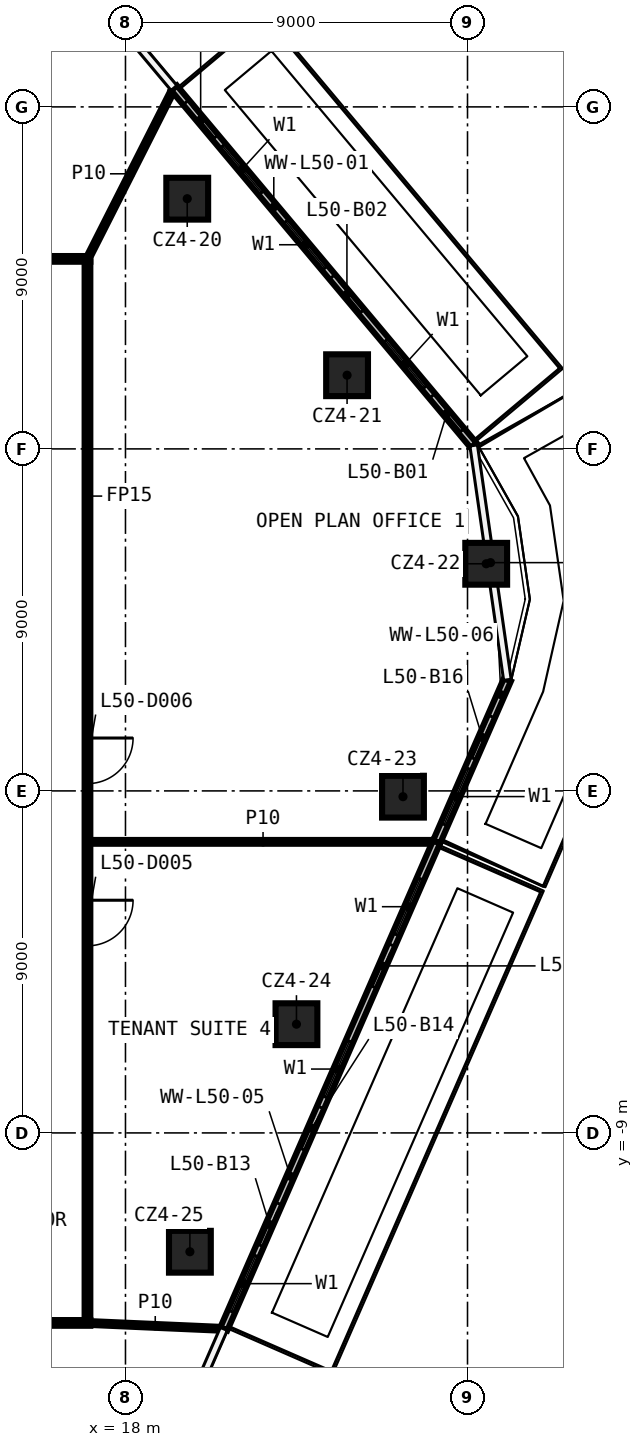
"""IFC4 building model, lengths in metres.
Left out: names, types, materials, properties, quantities, classifications, styles, units other than length and angle.
Written with IfcOpenShell. Run it as: python <this file> out.ifc"""

import sys

from ifc_helpers import new_model, si_unit, direction, frame, frame_2d, origin, origin_2d, place, context, subcontext, project, spatial, rectangle, extrude, element, fill, save


model = new_model("IFC4")
c1 = context("Model", 3, precision=1e-05, world=origin(), true_north=direction((0.0, 1.0)))
c2 = subcontext(c1, "Body", "Model", "MODEL_VIEW")
j1 = project(units=[si_unit("LENGTHUNIT", "METRE"), si_unit("PLANEANGLEUNIT", "RADIAN")], contexts=[c1])
p1 = place(None, origin())
s1 = spatial("IfcSite", under=j1, at=p1, CompositionType="ELEMENT")
p2 = place(p1, origin())
s2 = spatial("IfcBuilding", under=s1, at=p2, CompositionType="ELEMENT")
p3 = place(p2, frame((0.0, 0.0, 241.2)))
s3 = spatial("IfcBuildingStorey", under=s2, at=p3, CompositionType="ELEMENT", Elevation=241.2)
for number, where, z_axis, x_axis in (
    (1, (19.625, 15.584, 0.0), (0.0, 0.0, 1.0), (1.0, 0.0, 0.0)),
    (2, (23.831, 10.939, 0.0), (0.0, 0.0, 1.0), (1.0, 0.0, 0.0)),
    (3, (27.492, 5.977, 0.0), (0.0, 0.0, 1.0), (1.0, 0.0, 0.0)),
    (4, (25.302, -0.152, 0.0), (0.0, 0.0, 1.0), (1.0, 0.0, 0.0)),
    (5, (22.499, -6.139, 0.0), (0.0, 0.0, 1.0), (1.0, 0.0, 0.0)),
    (6, (19.695, -12.127, 0.0), (0.0, 0.0, 1.0), (1.0, 0.0, 0.0)),
):
    element("IfcColumn", number, at=place(p3, frame(where, z_axis=z_axis, x_axis=x_axis)), inside=s3, PredefinedType="COLUMN", context=c2, shape_type="SweptSolid", body=[
        extrude(rectangle(XDim=1.1, YDim=1.1, at=origin_2d()), origin(), (0.0, 0.0, 1.0), 3.82),
    ])
p4 = place(p3, frame((17.075, -14.0, 0.0), z_axis=(0.0, 0.0, 1.0), x_axis=(-1.0, 0.0, 0.0)))
e7 = element("IfcWall", 7, at=p4, inside=s3, PredefinedType="PARTITIONING", context=c2, shape_type="SweptSolid", body=[
    extrude(rectangle(XDim=26.15, YDim=0.15, at=frame_2d((13.075, 0.0))), origin(), (0.0, 0.0, 1.0), 3.82),
])
p5 = place(p4, frame((23.476, 0.0, 0.0)))
e8 = element("IfcOpeningElement", 8, at=p5, cuts=e7, PredefinedType="OPENING", context=c2, shape_type="SweptSolid", body=[
    extrude(rectangle(XDim=1.2, YDim=2.1, at=frame_2d((0.6, 1.05))), frame((0.0, 0.085, 0.0), z_axis=(0.0, -1.0, 0.0), x_axis=(1.0, 0.0, 0.0)), (0.0, 0.0, 1.0), 0.17),
])
p6 = place(p4, frame((19.452, 0.0, 0.0)))
e9 = element("IfcOpeningElement", 9, at=p6, cuts=e7, PredefinedType="OPENING", context=c2, shape_type="SweptSolid", body=[
    extrude(rectangle(XDim=1.2, YDim=2.1, at=frame_2d((0.6, 1.05))), frame((0.0, 0.085, 0.0), z_axis=(0.0, -1.0, 0.0), x_axis=(1.0, 0.0, 0.0)), (0.0, 0.0, 1.0), 0.17),
])
p7 = place(p4, frame((11.351, 0.0, 0.0)))
e10 = element("IfcOpeningElement", 10, at=p7, cuts=e7, PredefinedType="OPENING", context=c2, shape_type="SweptSolid", body=[
    extrude(rectangle(XDim=1.2, YDim=2.1, at=frame_2d((0.6, 1.05))), frame((0.0, 0.085, 0.0), z_axis=(0.0, -1.0, 0.0), x_axis=(1.0, 0.0, 0.0)), (0.0, 0.0, 1.0), 0.17),
])
p8 = place(p4, frame((3.125, 0.0, 0.0)))
e11 = element("IfcOpeningElement", 11, at=p8, cuts=e7, PredefinedType="OPENING", context=c2, shape_type="SweptSolid", body=[
    extrude(rectangle(XDim=1.2, YDim=2.1, at=frame_2d((0.6, 1.05))), frame((0.0, 0.085, 0.0), z_axis=(0.0, -1.0, 0.0), x_axis=(1.0, 0.0, 0.0)), (0.0, 0.0, 1.0), 0.17),
])
p9 = place(p3, frame((17.075, -1.341, 0.0), z_axis=(0.0, 0.0, 1.0), x_axis=(1.0, 0.0, 0.0)))
e12 = element("IfcWall", 12, at=p9, inside=s3, PredefinedType="PARTITIONING", context=c2, shape_type="SweptSolid", body=[
    extrude(rectangle(XDim=9.09, YDim=0.1, at=frame_2d((4.545, 0.0))), origin(), (0.0, 0.0, 1.0), 3.82),
])
p10 = place(p3, frame((-9.075, 14.0, 0.0), z_axis=(0.0, 0.0, 1.0), x_axis=(1.0, 0.0, 0.0)))
e13 = element("IfcWall", 13, at=p10, inside=s3, PredefinedType="PARTITIONING", context=c2, shape_type="SweptSolid", body=[
    extrude(rectangle(XDim=26.15, YDim=0.15, at=frame_2d((13.075, 0.0))), origin(), (0.0, 0.0, 1.0), 3.82),
])
p11 = place(p10, frame((20.934, 0.0, 0.0)))
e14 = element("IfcOpeningElement", 14, at=p11, cuts=e13, PredefinedType="OPENING", context=c2, shape_type="SweptSolid", body=[
    extrude(rectangle(XDim=1.2, YDim=2.1, at=frame_2d((0.6, 1.05))), frame((0.0, 0.085, 0.0), z_axis=(0.0, -1.0, 0.0), x_axis=(1.0, 0.0, 0.0)), (0.0, 0.0, 1.0), 0.17),
])
p12 = place(p10, frame((15.49, 0.0, 0.0)))
e15 = element("IfcOpeningElement", 15, at=p12, cuts=e13, PredefinedType="OPENING", context=c2, shape_type="SweptSolid", body=[
    extrude(rectangle(XDim=1.2, YDim=2.1, at=frame_2d((0.6, 1.05))), frame((0.0, 0.085, 0.0), z_axis=(0.0, -1.0, 0.0), x_axis=(1.0, 0.0, 0.0)), (0.0, 0.0, 1.0), 0.17),
])
p13 = place(p10, frame((7.396, 0.0, 0.0)))
e16 = element("IfcOpeningElement", 16, at=p13, cuts=e13, PredefinedType="OPENING", context=c2, shape_type="SweptSolid", body=[
    extrude(rectangle(XDim=1.2, YDim=2.1, at=frame_2d((0.6, 1.05))), frame((0.0, 0.085, 0.0), z_axis=(0.0, -1.0, 0.0), x_axis=(1.0, 0.0, 0.0)), (0.0, 0.0, 1.0), 0.17),
])
p14 = place(p10, frame((3.346, 0.0, 0.0)))
e17 = element("IfcOpeningElement", 17, at=p14, cuts=e13, PredefinedType="OPENING", context=c2, shape_type="SweptSolid", body=[
    extrude(rectangle(XDim=1.2, YDim=2.1, at=frame_2d((0.6, 1.05))), frame((0.0, 0.085, 0.0), z_axis=(0.0, -1.0, 0.0), x_axis=(1.0, 0.0, 0.0)), (0.0, 0.0, 1.0), 0.17),
])
p15 = place(p3, frame((17.0, 14.0, 0.0), z_axis=(0.0, 0.0, 1.0), x_axis=(0.451643796449, 0.892198341811, 0.0)))
e18 = element("IfcWall", 18, at=p15, inside=s3, PredefinedType="PARTITIONING", context=c2, shape_type="SweptSolid", body=[
    extrude(rectangle(XDim=5.02, YDim=0.1, at=frame_2d((2.51, 0.0))), origin(), (0.0, 0.0, 1.0), 3.82),
])
p16 = place(p3, frame((17.0, 13.925, 0.0), z_axis=(0.0, 0.0, 1.0), x_axis=(0.0, -1.0, 0.0)))
e19 = element("IfcWall", 19, at=p16, inside=s3, PredefinedType="PARTITIONING", context=c2, shape_type="SweptSolid", body=[
    extrude(rectangle(XDim=27.85, YDim=0.15, at=frame_2d((13.925, 0.0))), origin(), (0.0, 0.0, 1.0), 3.82),
])
p17 = place(p16, frame((16.802, 0.0, 0.0)))
e20 = element("IfcOpeningElement", 20, at=p17, cuts=e19, PredefinedType="OPENING", context=c2, shape_type="SweptSolid", body=[
    extrude(rectangle(XDim=1.2, YDim=2.1, at=frame_2d((0.6, 1.05))), frame((0.0, 0.085, 0.0), z_axis=(0.0, -1.0, 0.0), x_axis=(1.0, 0.0, 0.0)), (0.0, 0.0, 1.0), 0.17),
])
p18 = place(p16, frame((12.534, 0.0, 0.0)))
e21 = element("IfcOpeningElement", 21, at=p18, cuts=e19, PredefinedType="OPENING", context=c2, shape_type="SweptSolid", body=[
    extrude(rectangle(XDim=1.2, YDim=2.1, at=frame_2d((0.6, 1.05))), frame((0.0, 0.085, 0.0), z_axis=(0.0, -1.0, 0.0), x_axis=(1.0, 0.0, 0.0)), (0.0, 0.0, 1.0), 0.17),
])
p19 = place(p3, frame((17.0, -14.0, 0.0), z_axis=(0.0, 0.0, 1.0), x_axis=(0.99903279054, -0.043971393272, 0.0)))
e22 = element("IfcWall", 22, at=p19, inside=s3, PredefinedType="PARTITIONING", context=c2, shape_type="SweptSolid", body=[
    extrude(rectangle(XDim=3.57, YDim=0.1, at=frame_2d((1.785, 0.0))), origin(), (0.0, 0.0, 1.0), 3.82),
])
p20 = place(p3, frame((27.162, 9.091, 0.0), z_axis=(0.0, 0.0, 1.0), x_axis=(-0.642398297857, 0.766370946025, 0.0)))
e23 = element("IfcWall", 23, at=p20, inside=s3, PredefinedType="SOLIDWALL", context=c2, shape_type="SweptSolid", body=[
    extrude(rectangle(XDim=12.275, YDim=0.2, at=frame_2d((6.137, 0.0))), origin(), (0.0, 0.0, 1.0), 3.82),
])
p21 = place(p20, frame((2.0, 0.0, 0.6)))
e24 = element("IfcOpeningElement", 24, at=p21, cuts=e23, PredefinedType="OPENING", context=c2, shape_type="SweptSolid", body=[
    extrude(rectangle(XDim=1.6, YDim=2.4, at=frame_2d((0.8, 1.2))), frame((0.0, 0.11, 0.0), z_axis=(0.0, -1.0, 0.0), x_axis=(1.0, 0.0, 0.0)), (0.0, 0.0, 1.0), 0.22),
])
p22 = place(p20, frame((0.5, 0.0, 0.0)))
e25 = element("IfcOpeningElement", 25, at=p22, cuts=e23, PredefinedType="OPENING", context=c2, shape_type="SweptSolid", body=[
    extrude(rectangle(XDim=1.2, YDim=2.4, at=frame_2d((0.6, 1.2))), frame((0.0, 0.11, 0.0), z_axis=(0.0, -1.0, 0.0), x_axis=(1.0, 0.0, 0.0)), (0.0, 0.0, 1.0), 0.22),
])
p23 = place(p20, frame((6.092, 0.0, 0.6)))
e26 = element("IfcOpeningElement", 26, at=p23, cuts=e23, PredefinedType="OPENING", context=c2, shape_type="SweptSolid", body=[
    extrude(rectangle(XDim=1.6, YDim=2.4, at=frame_2d((0.8, 1.2))), frame((0.0, 0.11, 0.0), z_axis=(0.0, -1.0, 0.0), x_axis=(1.0, 0.0, 0.0)), (0.0, 0.0, 1.0), 0.22),
])
p24 = place(p20, frame((4.592, 0.0, 0.0)))
e27 = element("IfcOpeningElement", 27, at=p24, cuts=e23, PredefinedType="OPENING", context=c2, shape_type="SweptSolid", body=[
    extrude(rectangle(XDim=1.2, YDim=2.4, at=frame_2d((0.6, 1.2))), frame((0.0, 0.11, 0.0), z_axis=(0.0, -1.0, 0.0), x_axis=(1.0, 0.0, 0.0)), (0.0, 0.0, 1.0), 0.22),
])
p25 = place(p20, frame((8.683, 0.0, 0.6)))
e28 = element("IfcOpeningElement", 28, at=p25, cuts=e23, PredefinedType="OPENING", context=c2, shape_type="SweptSolid", body=[
    extrude(rectangle(XDim=1.6, YDim=2.4, at=frame_2d((0.8, 1.2))), frame((0.0, 0.11, 0.0), z_axis=(0.0, -1.0, 0.0), x_axis=(1.0, 0.0, 0.0)), (0.0, 0.0, 1.0), 0.22),
])
p26 = place(p20, frame((10.583, 0.0, 0.0)))
e29 = element("IfcOpeningElement", 29, at=p26, cuts=e23, PredefinedType="OPENING", context=c2, shape_type="SweptSolid", body=[
    extrude(rectangle(XDim=1.2, YDim=2.4, at=frame_2d((0.6, 1.2))), frame((0.0, 0.11, 0.0), z_axis=(0.0, -1.0, 0.0), x_axis=(1.0, 0.0, 0.0)), (0.0, 0.0, 1.0), 0.22),
])
p27 = place(p3, frame((20.588, -14.158, 0.0), z_axis=(0.0, 0.0, 1.0), x_axis=(0.400286749381, 0.916389937892, 0.0)))
e30 = element("IfcWall", 30, at=p27, inside=s3, PredefinedType="SOLIDWALL", context=c2, shape_type="SweptSolid", body=[
    extrude(rectangle(XDim=13.987, YDim=0.2, at=frame_2d((6.993, 0.0))), origin(), (0.0, 0.0, 1.0), 3.82),
])
p28 = place(p27, frame((0.5, 0.0, 0.6)))
e31 = element("IfcOpeningElement", 31, at=p28, cuts=e30, PredefinedType="OPENING", context=c2, shape_type="SweptSolid", body=[
    extrude(rectangle(XDim=1.6, YDim=2.4, at=frame_2d((0.8, 1.2))), frame((0.0, 0.11, 0.0), z_axis=(0.0, -1.0, 0.0), x_axis=(1.0, 0.0, 0.0)), (0.0, 0.0, 1.0), 0.22),
])
p29 = place(p27, frame((2.4, 0.0, 0.0)))
e32 = element("IfcOpeningElement", 32, at=p29, cuts=e30, PredefinedType="OPENING", context=c2, shape_type="SweptSolid", body=[
    extrude(rectangle(XDim=1.2, YDim=2.4, at=frame_2d((0.6, 1.2))), frame((0.0, 0.11, 0.0), z_axis=(0.0, -1.0, 0.0), x_axis=(1.0, 0.0, 0.0)), (0.0, 0.0, 1.0), 0.22),
])
p30 = place(p27, frame((6.662, 0.0, 0.6)))
e33 = element("IfcOpeningElement", 33, at=p30, cuts=e30, PredefinedType="OPENING", context=c2, shape_type="SweptSolid", body=[
    extrude(rectangle(XDim=1.6, YDim=2.4, at=frame_2d((0.8, 1.2))), frame((0.0, 0.11, 0.0), z_axis=(0.0, -1.0, 0.0), x_axis=(1.0, 0.0, 0.0)), (0.0, 0.0, 1.0), 0.22),
])
p31 = place(p27, frame((5.162, 0.0, 0.0)))
e34 = element("IfcOpeningElement", 34, at=p31, cuts=e30, PredefinedType="OPENING", context=c2, shape_type="SweptSolid", body=[
    extrude(rectangle(XDim=1.2, YDim=2.4, at=frame_2d((0.6, 1.2))), frame((0.0, 0.11, 0.0), z_axis=(0.0, -1.0, 0.0), x_axis=(1.0, 0.0, 0.0)), (0.0, 0.0, 1.0), 0.22),
])
p32 = place(p27, frame((11.324, 0.0, 0.6)))
e35 = element("IfcOpeningElement", 35, at=p32, cuts=e30, PredefinedType="OPENING", context=c2, shape_type="SweptSolid", body=[
    extrude(rectangle(XDim=1.6, YDim=2.4, at=frame_2d((0.8, 1.2))), frame((0.0, 0.11, 0.0), z_axis=(0.0, -1.0, 0.0), x_axis=(1.0, 0.0, 0.0)), (0.0, 0.0, 1.0), 0.22),
])
p33 = place(p27, frame((9.824, 0.0, 0.0)))
e36 = element("IfcOpeningElement", 36, at=p33, cuts=e30, PredefinedType="OPENING", context=c2, shape_type="SweptSolid", body=[
    extrude(rectangle(XDim=1.2, YDim=2.4, at=frame_2d((0.6, 1.2))), frame((0.0, 0.11, 0.0), z_axis=(0.0, -1.0, 0.0), x_axis=(1.0, 0.0, 0.0)), (0.0, 0.0, 1.0), 0.22),
])
p34 = place(p3, frame((26.187, -1.341, 0.0), z_axis=(0.0, 0.0, 1.0), x_axis=(0.400293036608, 0.916387191553, 0.0)))
e37 = element("IfcWall", 37, at=p34, inside=s3, PredefinedType="SOLIDWALL", context=c2, shape_type="SweptSolid", body=[
    extrude(rectangle(XDim=4.653, YDim=0.2, at=frame_2d((2.327, 0.0))), origin(), (0.0, 0.0, 1.0), 3.82),
])
p35 = place(p34, frame((0.5, 0.0, 0.6)))
e38 = element("IfcOpeningElement", 38, at=p35, cuts=e37, PredefinedType="OPENING", context=c2, shape_type="SweptSolid", body=[
    extrude(rectangle(XDim=1.6, YDim=2.4, at=frame_2d((0.8, 1.2))), frame((0.0, 0.11, 0.0), z_axis=(0.0, -1.0, 0.0), x_axis=(1.0, 0.0, 0.0)), (0.0, 0.0, 1.0), 0.22),
])
p36 = place(p34, frame((2.4, 0.0, 0.0)))
e39 = element("IfcOpeningElement", 39, at=p36, cuts=e37, PredefinedType="OPENING", context=c2, shape_type="SweptSolid", body=[
    extrude(rectangle(XDim=1.2, YDim=2.4, at=frame_2d((0.6, 1.2))), frame((0.0, 0.11, 0.0), z_axis=(0.0, -1.0, 0.0), x_axis=(1.0, 0.0, 0.0)), (0.0, 0.0, 1.0), 0.22),
])
p37 = place(p17, origin())
e40 = element("IfcDoor", 40, at=p37, inside=s3, OperationType="SINGLE_SWING_RIGHT", PredefinedType="DOOR", context=c2, shape_type="SweptSolid", body=[
    extrude(rectangle(XDim=1.2, YDim=2.1, at=frame_2d((0.6, 1.05))), frame((0.0, 0.025, 0.0), z_axis=(0.0, -1.0, 0.0), x_axis=(1.0, 0.0, 0.0)), (0.0, 0.0, 1.0), 0.05),
])
fill(e20, e40)
p38 = place(p18, origin())
e41 = element("IfcDoor", 41, at=p38, inside=s3, OperationType="SINGLE_SWING_LEFT", PredefinedType="DOOR", context=c2, shape_type="SweptSolid", body=[
    extrude(rectangle(XDim=1.2, YDim=2.1, at=frame_2d((0.6, 1.05))), frame((0.0, 0.025, 0.0), z_axis=(0.0, -1.0, 0.0), x_axis=(1.0, 0.0, 0.0)), (0.0, 0.0, 1.0), 0.05),
])
fill(e21, e41)
p39 = place(p21, origin())
e42 = element("IfcWindow", 42, at=p39, inside=s3, PartitioningType="SINGLE_PANEL", PredefinedType="WINDOW", context=c2, shape_type="SweptSolid", body=[
    extrude(rectangle(XDim=1.6, YDim=2.4, at=frame_2d((0.8, 1.2))), frame((0.0, 0.03, 0.0), z_axis=(0.0, -1.0, 0.0), x_axis=(1.0, 0.0, 0.0)), (0.0, 0.0, 1.0), 0.06),
])
fill(e24, e42)
p40 = place(p22, origin())
e43 = element("IfcDoor", 43, at=p40, inside=s3, OperationType="SLIDING_TO_LEFT", PredefinedType="DOOR", context=c2, shape_type="SweptSolid", body=[
    extrude(rectangle(XDim=1.2, YDim=2.4, at=frame_2d((0.6, 1.2))), frame((0.0, 0.025, 0.0), z_axis=(0.0, -1.0, 0.0), x_axis=(1.0, 0.0, 0.0)), (0.0, 0.0, 1.0), 0.05),
])
fill(e25, e43)
p41 = place(p23, origin())
e44 = element("IfcWindow", 44, at=p41, inside=s3, PartitioningType="SINGLE_PANEL", PredefinedType="WINDOW", context=c2, shape_type="SweptSolid", body=[
    extrude(rectangle(XDim=1.6, YDim=2.4, at=frame_2d((0.8, 1.2))), frame((0.0, 0.03, 0.0), z_axis=(0.0, -1.0, 0.0), x_axis=(1.0, 0.0, 0.0)), (0.0, 0.0, 1.0), 0.06),
])
fill(e26, e44)
p42 = place(p24, origin())
e45 = element("IfcDoor", 45, at=p42, inside=s3, OperationType="SLIDING_TO_LEFT", PredefinedType="DOOR", context=c2, shape_type="SweptSolid", body=[
    extrude(rectangle(XDim=1.2, YDim=2.4, at=frame_2d((0.6, 1.2))), frame((0.0, 0.025, 0.0), z_axis=(0.0, -1.0, 0.0), x_axis=(1.0, 0.0, 0.0)), (0.0, 0.0, 1.0), 0.05),
])
fill(e27, e45)
p43 = place(p25, origin())
e46 = element("IfcWindow", 46, at=p43, inside=s3, PartitioningType="SINGLE_PANEL", PredefinedType="WINDOW", context=c2, shape_type="SweptSolid", body=[
    extrude(rectangle(XDim=1.6, YDim=2.4, at=frame_2d((0.8, 1.2))), frame((0.0, 0.03, 0.0), z_axis=(0.0, -1.0, 0.0), x_axis=(1.0, 0.0, 0.0)), (0.0, 0.0, 1.0), 0.06),
])
fill(e28, e46)
p44 = place(p26, origin())
e47 = element("IfcDoor", 47, at=p44, inside=s3, OperationType="SLIDING_TO_LEFT", PredefinedType="DOOR", context=c2, shape_type="SweptSolid", body=[
    extrude(rectangle(XDim=1.2, YDim=2.4, at=frame_2d((0.6, 1.2))), frame((0.0, 0.025, 0.0), z_axis=(0.0, -1.0, 0.0), x_axis=(1.0, 0.0, 0.0)), (0.0, 0.0, 1.0), 0.05),
])
fill(e29, e47)
p45 = place(p28, origin())
e48 = element("IfcWindow", 48, at=p45, inside=s3, PartitioningType="SINGLE_PANEL", PredefinedType="WINDOW", context=c2, shape_type="SweptSolid", body=[
    extrude(rectangle(XDim=1.6, YDim=2.4, at=frame_2d((0.8, 1.2))), frame((0.0, 0.03, 0.0), z_axis=(0.0, -1.0, 0.0), x_axis=(1.0, 0.0, 0.0)), (0.0, 0.0, 1.0), 0.06),
])
fill(e31, e48)
p46 = place(p29, origin())
e49 = element("IfcDoor", 49, at=p46, inside=s3, OperationType="SLIDING_TO_LEFT", PredefinedType="DOOR", context=c2, shape_type="SweptSolid", body=[
    extrude(rectangle(XDim=1.2, YDim=2.4, at=frame_2d((0.6, 1.2))), frame((0.0, 0.025, 0.0), z_axis=(0.0, -1.0, 0.0), x_axis=(1.0, 0.0, 0.0)), (0.0, 0.0, 1.0), 0.05),
])
fill(e32, e49)
p47 = place(p30, origin())
e50 = element("IfcWindow", 50, at=p47, inside=s3, PartitioningType="SINGLE_PANEL", PredefinedType="WINDOW", context=c2, shape_type="SweptSolid", body=[
    extrude(rectangle(XDim=1.6, YDim=2.4, at=frame_2d((0.8, 1.2))), frame((0.0, 0.03, 0.0), z_axis=(0.0, -1.0, 0.0), x_axis=(1.0, 0.0, 0.0)), (0.0, 0.0, 1.0), 0.06),
])
fill(e33, e50)
p48 = place(p31, origin())
e51 = element("IfcDoor", 51, at=p48, inside=s3, OperationType="SLIDING_TO_LEFT", PredefinedType="DOOR", context=c2, shape_type="SweptSolid", body=[
    extrude(rectangle(XDim=1.2, YDim=2.4, at=frame_2d((0.6, 1.2))), frame((0.0, 0.025, 0.0), z_axis=(0.0, -1.0, 0.0), x_axis=(1.0, 0.0, 0.0)), (0.0, 0.0, 1.0), 0.05),
])
fill(e34, e51)
p49 = place(p32, origin())
e52 = element("IfcWindow", 52, at=p49, inside=s3, PartitioningType="SINGLE_PANEL", PredefinedType="WINDOW", context=c2, shape_type="SweptSolid", body=[
    extrude(rectangle(XDim=1.6, YDim=2.4, at=frame_2d((0.8, 1.2))), frame((0.0, 0.03, 0.0), z_axis=(0.0, -1.0, 0.0), x_axis=(1.0, 0.0, 0.0)), (0.0, 0.0, 1.0), 0.06),
])
fill(e35, e52)
p50 = place(p33, origin())
e53 = element("IfcDoor", 53, at=p50, inside=s3, OperationType="SLIDING_TO_LEFT", PredefinedType="DOOR", context=c2, shape_type="SweptSolid", body=[
    extrude(rectangle(XDim=1.2, YDim=2.4, at=frame_2d((0.6, 1.2))), frame((0.0, 0.025, 0.0), z_axis=(0.0, -1.0, 0.0), x_axis=(1.0, 0.0, 0.0)), (0.0, 0.0, 1.0), 0.05),
])
fill(e36, e53)
p51 = place(p35, origin())
e54 = element("IfcWindow", 54, at=p51, inside=s3, PartitioningType="SINGLE_PANEL", PredefinedType="WINDOW", context=c2, shape_type="SweptSolid", body=[
    extrude(rectangle(XDim=1.6, YDim=2.4, at=frame_2d((0.8, 1.2))), frame((0.0, 0.03, 0.0), z_axis=(0.0, -1.0, 0.0), x_axis=(1.0, 0.0, 0.0)), (0.0, 0.0, 1.0), 0.06),
])
fill(e38, e54)
p52 = place(p36, origin())
e55 = element("IfcDoor", 55, at=p52, inside=s3, OperationType="SLIDING_TO_LEFT", PredefinedType="DOOR", context=c2, shape_type="SweptSolid", body=[
    extrude(rectangle(XDim=1.2, YDim=2.4, at=frame_2d((0.6, 1.2))), frame((0.0, 0.025, 0.0), z_axis=(0.0, -1.0, 0.0), x_axis=(1.0, 0.0, 0.0)), (0.0, 0.0, 1.0), 0.05),
])
fill(e39, e55)
save(model, sys.argv[1])
